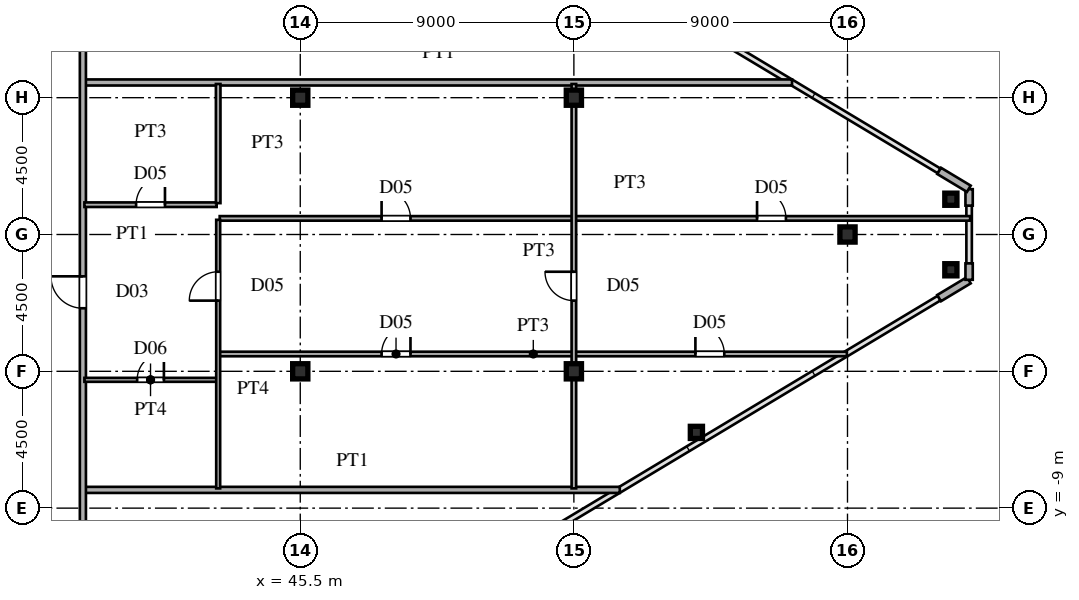
"""IFC4 building model, lengths in metres.
Left out: names, types, materials, properties, quantities, classifications, styles, units other than length and angle.
Written with IfcOpenShell. Run it as: python <this file> out.ifc"""

import sys

from ifc_helpers import new_model, si_unit, direction, frame, frame_2d, origin, origin_2d, place, context, subcontext, project, spatial, rectangle, hollow_rectangle, i_section, extrude, source, transform, mapped, element, fill, save


model = new_model("IFC4")
c1 = context("Model", 3, precision=1e-05, world=origin(), true_north=direction((0.0, 1.0)))
c2 = subcontext(c1, "Body", "Model", "MODEL_VIEW")
j1 = project(units=[si_unit("LENGTHUNIT", "METRE"), si_unit("PLANEANGLEUNIT", "RADIAN")], contexts=[c1])
p1 = place(None, origin())
s1 = spatial("IfcSite", under=j1, at=p1, CompositionType="ELEMENT")
p2 = place(p1, origin())
s2 = spatial("IfcBuilding", under=s1, at=p2, CompositionType="ELEMENT")
p3 = place(p2, frame((0.0, 0.0, 221.1)))
s3 = spatial("IfcBuildingStorey", under=s2, at=p3, CompositionType="ELEMENT", Elevation=221.1)
m1 = source(origin(), c2, "Body", "SweptSolid", [
    extrude(i_section(OverallWidth=0.5, OverallDepth=0.5, WebThickness=0.02, FlangeThickness=0.032, at=origin_2d()), origin(), (0.0, 0.0, 1.0), 3.6),
])
for number, where, z_axis, x_axis in (
    (1, (45.5, -4.5, 0.0), (0.0, 0.0, 1.0), (1.0, 0.0, 0.0)),
    (2, (45.5, 4.5, 0.0), (0.0, 0.0, 1.0), (1.0, 0.0, 0.0)),
    (3, (54.5, -4.5, 0.0), (0.0, 0.0, 1.0), (1.0, 0.0, 0.0)),
    (4, (54.5, 4.5, 0.0), (0.0, 0.0, 1.0), (1.0, 0.0, 0.0)),
    (5, (63.5, 0.0, 0.0), (0.0, 0.0, 1.0), (1.0, 0.0, 0.0)),
):
    element("IfcColumn", number, at=place(p3, frame(where, z_axis=z_axis, x_axis=x_axis)), inside=s3, PredefinedType="COLUMN", context=c2, shape_type="MappedRepresentation", body=[
        mapped(m1, transform((0.0, 0.0, 0.0), scale=1.0)),
    ])
m2 = source(origin(), c2, "Body", "SweptSolid", [
    extrude(hollow_rectangle(XDim=0.4, YDim=0.4, WallThickness=0.016, at=origin_2d()), origin(), (0.0, 0.0, 1.0), 3.6),
])
for number, where, z_axis, x_axis in (
    (6, (66.9, -1.16, 0.0), (0.0, 0.0, 1.0), (1.0, 0.0, 0.0)),
    (7, (66.9, 1.16, 0.0), (0.0, 0.0, 1.0), (1.0, 0.0, 0.0)),
    (8, (58.53, -6.509, 0.0), (0.0, 0.0, 1.0), (1.0, 0.0, 0.0)),
):
    element("IfcColumn", number, at=place(p3, frame(where, z_axis=z_axis, x_axis=x_axis)), inside=s3, PredefinedType="COLUMN", context=c2, shape_type="MappedRepresentation", body=[
        mapped(m2, transform((0.0, 0.0, 0.0), scale=1.0)),
    ])
p4 = place(p3, frame((66.514, -2.092, 0.0), z_axis=(0.0, 0.0, 1.0), x_axis=(0.85743623509, 0.514590228002, 0.0)))
e9 = element("IfcWall", 9, at=p4, inside=s3, PredefinedType="SOLIDWALL", context=c2, shape_type="SweptSolid", body=[
    extrude(rectangle(XDim=1.14, YDim=0.24, at=frame_2d((0.57, 0.0))), origin(), (0.0, 0.0, 1.0), 3.34),
])
for number, where, z_axis, x_axis in (
    (10, (67.5, -1.49, 0.0), (0.0, 0.0, 1.0), (0.0, 1.0, 0.0)),
    (11, (67.5, 0.95, 0.0), (0.0, 0.0, 1.0), (0.0, 1.0, 0.0)),
):
    element("IfcWall", number, at=place(p3, frame(where, z_axis=z_axis, x_axis=x_axis)), inside=s3, PredefinedType="SOLIDWALL", context=c2, shape_type="SweptSolid", body=[
        extrude(rectangle(XDim=0.54, YDim=0.24, at=frame_2d((0.27, 0.0))), origin(), (0.0, 0.0, 1.0), 3.34),
    ])
p5 = place(p3, frame((67.491, 1.505, 0.0), z_axis=(0.0, 0.0, 1.0), x_axis=(-0.85743623509, 0.514590228002, 0.0)))
e12 = element("IfcWall", 12, at=p5, inside=s3, PredefinedType="SOLIDWALL", context=c2, shape_type="SweptSolid", body=[
    extrude(rectangle(XDim=1.14, YDim=0.24, at=frame_2d((0.57, 0.0))), origin(), (0.0, 0.0, 1.0), 3.34),
])
p6 = place(p3, frame((38.43, -8.4, 0.0), z_axis=(0.0, 0.0, 1.0), x_axis=(1.0, 0.0, 0.0)))
e13 = element("IfcWall", 13, at=p6, inside=s3, PredefinedType="PARTITIONING", context=c2, shape_type="SweptSolid", body=[
    extrude(rectangle(XDim=17.58, YDim=0.2, at=frame_2d((8.79, 0.0))), origin(), (0.0, 0.0, 1.0), 3.34),
])
p7 = place(p3, frame((38.4, -4.78, 0.0), z_axis=(0.0, 0.0, 1.0), x_axis=(1.0, 0.0, 0.0)))
e14 = element("IfcWall", 14, at=p7, inside=s3, PredefinedType="PARTITIONING", context=c2, shape_type="SweptSolid", body=[
    extrude(rectangle(XDim=4.35, YDim=0.13, at=frame_2d((2.175, 0.0))), origin(), (0.0, 0.0, 1.0), 3.34),
])
p8 = place(p7, frame((1.735, 0.0, 0.0)))
e15 = element("IfcOpeningElement", 15, at=p8, cuts=e14, PredefinedType="OPENING", context=c2, shape_type="SweptSolid", body=[
    extrude(rectangle(XDim=0.88, YDim=2.1, at=frame_2d((0.44, 1.05))), frame((0.0, 0.075, 0.0), z_axis=(0.0, -1.0, 0.0), x_axis=(1.0, 0.0, 0.0)), (0.0, 0.0, 1.0), 0.15),
])
p9 = place(p3, frame((42.85, -3.93, 0.0), z_axis=(0.0, 0.0, 1.0), x_axis=(1.0, 0.0, 0.0)))
e16 = element("IfcWall", 16, at=p9, inside=s3, PredefinedType="PARTITIONING", context=c2, shape_type="SweptSolid", body=[
    extrude(rectangle(XDim=20.63, YDim=0.15, at=frame_2d((10.315, 0.0))), origin(), (0.0, 0.0, 1.0), 3.34),
])
p10 = place(p9, frame((5.325, 0.0, 0.0)))
e17 = element("IfcOpeningElement", 17, at=p10, cuts=e16, PredefinedType="OPENING", context=c2, shape_type="SweptSolid", body=[
    extrude(rectangle(XDim=0.95, YDim=2.15, at=frame_2d((0.475, 1.075))), frame((0.0, 0.085, 0.0), z_axis=(0.0, -1.0, 0.0), x_axis=(1.0, 0.0, 0.0)), (0.0, 0.0, 1.0), 0.17),
])
p11 = place(p9, frame((15.647, 0.0, 0.0)))
e18 = element("IfcOpeningElement", 18, at=p11, cuts=e16, PredefinedType="OPENING", context=c2, shape_type="SweptSolid", body=[
    extrude(rectangle(XDim=0.95, YDim=2.15, at=frame_2d((0.475, 1.075))), frame((0.0, 0.085, 0.0), z_axis=(0.0, -1.0, 0.0), x_axis=(1.0, 0.0, 0.0)), (0.0, 0.0, 1.0), 0.17),
])
p12 = place(p3, frame((42.85, 0.53, 0.0), z_axis=(0.0, 0.0, 1.0), x_axis=(1.0, 0.0, 0.0)))
e19 = element("IfcWall", 19, at=p12, inside=s3, PredefinedType="PARTITIONING", context=c2, shape_type="SweptSolid", body=[
    extrude(rectangle(XDim=24.685, YDim=0.15, at=frame_2d((12.342, 0.0))), origin(), (0.0, 0.0, 1.0), 3.34),
])
p13 = place(p12, frame((5.325, 0.0, 0.0)))
e20 = element("IfcOpeningElement", 20, at=p13, cuts=e19, PredefinedType="OPENING", context=c2, shape_type="SweptSolid", body=[
    extrude(rectangle(XDim=0.95, YDim=2.15, at=frame_2d((0.475, 1.075))), frame((0.0, 0.085, 0.0), z_axis=(0.0, -1.0, 0.0), x_axis=(1.0, 0.0, 0.0)), (0.0, 0.0, 1.0), 0.17),
])
p14 = place(p12, frame((17.675, 0.0, 0.0)))
e21 = element("IfcOpeningElement", 21, at=p14, cuts=e19, PredefinedType="OPENING", context=c2, shape_type="SweptSolid", body=[
    extrude(rectangle(XDim=0.95, YDim=2.15, at=frame_2d((0.475, 1.075))), frame((0.0, 0.085, 0.0), z_axis=(0.0, -1.0, 0.0), x_axis=(1.0, 0.0, 0.0)), (0.0, 0.0, 1.0), 0.17),
])
p15 = place(p3, frame((38.4, 0.98, 0.0), z_axis=(0.0, 0.0, 1.0), x_axis=(1.0, 0.0, 0.0)))
e22 = element("IfcWall", 22, at=p15, inside=s3, PredefinedType="PARTITIONING", context=c2, shape_type="SweptSolid", body=[
    extrude(rectangle(XDim=4.35, YDim=0.15, at=frame_2d((2.175, 0.0))), origin(), (0.0, 0.0, 1.0), 3.34),
])
p16 = place(p15, frame((1.7, 0.0, 0.0)))
e23 = element("IfcOpeningElement", 23, at=p16, cuts=e22, PredefinedType="OPENING", context=c2, shape_type="SweptSolid", body=[
    extrude(rectangle(XDim=0.95, YDim=2.15, at=frame_2d((0.475, 1.075))), frame((0.0, 0.085, 0.0), z_axis=(0.0, -1.0, 0.0), x_axis=(1.0, 0.0, 0.0)), (0.0, 0.0, 1.0), 0.17),
])
p17 = place(p3, frame((38.43, 5.0, 0.0), z_axis=(0.0, 0.0, 1.0), x_axis=(1.0, 0.0, 0.0)))
e24 = element("IfcWall", 24, at=p17, inside=s3, PredefinedType="PARTITIONING", context=c2, shape_type="SweptSolid", body=[
    extrude(rectangle(XDim=23.246, YDim=0.2, at=frame_2d((11.623, 0.0))), origin(), (0.0, 0.0, 1.0), 3.34),
])
p18 = place(p3, frame((38.35, -15.715, 0.0), z_axis=(0.0, 0.0, 1.0), x_axis=(0.0, 1.0, 0.0)))
e25 = element("IfcWall", 25, at=p18, inside=s3, PredefinedType="PARTITIONING", context=c2, shape_type="SweptSolid", body=[
    extrude(rectangle(XDim=31.43, YDim=0.2, at=frame_2d((15.715, 0.0))), origin(), (0.0, 0.0, 1.0), 3.34),
])
p19 = place(p18, frame((3.09, 0.0, 0.0)))
e26 = element("IfcOpeningElement", 26, at=p19, cuts=e25, PredefinedType="OPENING", context=c2, shape_type="SweptSolid", body=[
    extrude(rectangle(XDim=1.05, YDim=2.25, at=frame_2d((0.525, 1.125))), frame((0.0, 0.11, 0.0), z_axis=(0.0, -1.0, 0.0), x_axis=(1.0, 0.0, 0.0)), (0.0, 0.0, 1.0), 0.22),
])
p20 = place(p18, frame((13.289, 0.0, 0.0)))
e27 = element("IfcOpeningElement", 27, at=p20, cuts=e25, PredefinedType="OPENING", context=c2, shape_type="SweptSolid", body=[
    extrude(rectangle(XDim=1.05, YDim=2.25, at=frame_2d((0.525, 1.125))), frame((0.0, 0.11, 0.0), z_axis=(0.0, -1.0, 0.0), x_axis=(1.0, 0.0, 0.0)), (0.0, 0.0, 1.0), 0.22),
])
p21 = place(p18, frame((25.59, 0.0, 0.0)))
e28 = element("IfcOpeningElement", 28, at=p21, cuts=e25, PredefinedType="OPENING", context=c2, shape_type="SweptSolid", body=[
    extrude(rectangle(XDim=1.05, YDim=2.25, at=frame_2d((0.525, 1.125))), frame((0.0, 0.11, 0.0), z_axis=(0.0, -1.0, 0.0), x_axis=(1.0, 0.0, 0.0)), (0.0, 0.0, 1.0), 0.22),
])
p22 = place(p3, frame((42.8, -8.35, 0.0), z_axis=(0.0, 0.0, 1.0), x_axis=(0.0, 1.0, 0.0)))
e29 = element("IfcWall", 29, at=p22, inside=s3, PredefinedType="PARTITIONING", context=c2, shape_type="SweptSolid", body=[
    extrude(rectangle(XDim=8.833, YDim=0.13, at=frame_2d((4.417, 0.0))), origin(), (0.0, 0.0, 1.0), 3.34),
])
p23 = place(p22, frame((6.175, 0.0, 0.0)))
e30 = element("IfcOpeningElement", 30, at=p23, cuts=e29, PredefinedType="OPENING", context=c2, shape_type="SweptSolid", body=[
    extrude(rectangle(XDim=0.95, YDim=2.15, at=frame_2d((0.475, 1.075))), frame((0.0, 0.075, 0.0), z_axis=(0.0, -1.0, 0.0), x_axis=(1.0, 0.0, 0.0)), (0.0, 0.0, 1.0), 0.15),
])
p24 = place(p3, frame((42.8, 1.032, 0.0), z_axis=(0.0, 0.0, 1.0), x_axis=(0.0, 1.0, 0.0)))
e31 = element("IfcWall", 31, at=p24, inside=s3, PredefinedType="PARTITIONING", context=c2, shape_type="SweptSolid", body=[
    extrude(rectangle(XDim=3.918, YDim=0.15, at=frame_2d((1.959, 0.0))), origin(), (0.0, 0.0, 1.0), 3.34),
])
p25 = place(p3, frame((54.5, -8.35, 0.0), z_axis=(0.0, 0.0, 1.0), x_axis=(0.0, 1.0, 0.0)))
e32 = element("IfcWall", 32, at=p25, inside=s3, PredefinedType="PARTITIONING", context=c2, shape_type="SweptSolid", body=[
    extrude(rectangle(XDim=3.83, YDim=0.15, at=frame_2d((1.915, 0.0))), origin(), (0.0, 0.0, 1.0), 3.34),
])
p26 = place(p3, frame((54.5, -4.52, 0.0), z_axis=(0.0, 0.0, 1.0), x_axis=(0.0, 1.0, 0.0)))
e33 = element("IfcWall", 33, at=p26, inside=s3, PredefinedType="PARTITIONING", context=c2, shape_type="SweptSolid", body=[
    extrude(rectangle(XDim=9.47, YDim=0.15, at=frame_2d((4.735, 0.0))), origin(), (0.0, 0.0, 1.0), 2.44),
])
p27 = place(p26, frame((2.345, 0.0, 0.0)))
e34 = element("IfcOpeningElement", 34, at=p27, cuts=e33, PredefinedType="OPENING", context=c2, shape_type="SweptSolid", body=[
    extrude(rectangle(XDim=0.95, YDim=2.15, at=frame_2d((0.475, 1.075))), frame((0.0, 0.085, 0.0), z_axis=(0.0, -1.0, 0.0), x_axis=(1.0, 0.0, 0.0)), (0.0, 0.0, 1.0), 0.17),
])
m3 = source(origin(), c2, "Body", "SweptSolid", [
    extrude(rectangle(XDim=0.88, YDim=2.1, at=frame_2d((0.44, 1.05))), frame((0.0, 0.025, 0.0), z_axis=(0.0, -1.0, 0.0), x_axis=(1.0, 0.0, 0.0)), (0.0, 0.0, 1.0), 0.05),
])
p28 = place(p8, origin())
e35 = element("IfcDoor", 35, at=p28, inside=s3, OperationType="SINGLE_SWING_RIGHT", PredefinedType="DOOR", context=c2, shape_type="MappedRepresentation", body=[
    mapped(m3, transform((0.0, 0.0, 0.0), scale=1.0)),
])
fill(e15, e35)
m4 = source(origin(), c2, "Body", "SweptSolid", [
    extrude(rectangle(XDim=0.95, YDim=2.15, at=frame_2d((0.475, 1.075))), frame((0.0, 0.025, 0.0), z_axis=(0.0, -1.0, 0.0), x_axis=(1.0, 0.0, 0.0)), (0.0, 0.0, 1.0), 0.05),
])
p29 = place(p10, origin())
e36 = element("IfcDoor", 36, at=p29, inside=s3, OperationType="SINGLE_SWING_RIGHT", PredefinedType="DOOR", context=c2, shape_type="MappedRepresentation", body=[
    mapped(m4, transform((0.0, 0.0, 0.0), scale=1.0)),
])
fill(e17, e36)
p30 = place(p11, origin())
e37 = element("IfcDoor", 37, at=p30, inside=s3, OperationType="SINGLE_SWING_LEFT", PredefinedType="DOOR", context=c2, shape_type="MappedRepresentation", body=[
    mapped(m4, transform((0.0, 0.0, 0.0), scale=1.0)),
])
fill(e18, e37)
p31 = place(p13, origin())
e38 = element("IfcDoor", 38, at=p31, inside=s3, OperationType="SINGLE_SWING_LEFT", PredefinedType="DOOR", context=c2, shape_type="MappedRepresentation", body=[
    mapped(m4, transform((0.0, 0.0, 0.0), scale=1.0)),
])
fill(e20, e38)
p32 = place(p14, origin())
e39 = element("IfcDoor", 39, at=p32, inside=s3, OperationType="SINGLE_SWING_LEFT", PredefinedType="DOOR", context=c2, shape_type="MappedRepresentation", body=[
    mapped(m4, transform((0.0, 0.0, 0.0), scale=1.0)),
])
fill(e21, e39)
p33 = place(p16, origin())
e40 = element("IfcDoor", 40, at=p33, inside=s3, OperationType="SINGLE_SWING_RIGHT", PredefinedType="DOOR", context=c2, shape_type="MappedRepresentation", body=[
    mapped(m4, transform((0.0, 0.0, 0.0), scale=1.0)),
])
fill(e23, e40)
m5 = source(origin(), c2, "Body", "SweptSolid", [
    extrude(rectangle(XDim=1.05, YDim=2.25, at=frame_2d((0.525, 1.125))), frame((0.0, 0.025, 0.0), z_axis=(0.0, -1.0, 0.0), x_axis=(1.0, 0.0, 0.0)), (0.0, 0.0, 1.0), 0.05),
])
p34 = place(p20, origin())
e41 = element("IfcDoor", 41, at=p34, inside=s3, OperationType="SINGLE_SWING_RIGHT", PredefinedType="DOOR", context=c2, shape_type="MappedRepresentation", body=[
    mapped(m5, transform((0.0, 0.0, 0.0), scale=1.0)),
])
fill(e27, e41)
p35 = place(p23, origin())
e42 = element("IfcDoor", 42, at=p35, inside=s3, OperationType="SINGLE_SWING_LEFT", PredefinedType="DOOR", context=c2, shape_type="MappedRepresentation", body=[
    mapped(m4, transform((0.0, 0.0, 0.0), scale=1.0)),
])
fill(e30, e42)
p36 = place(p27, origin())
e43 = element("IfcDoor", 43, at=p36, inside=s3, OperationType="SINGLE_SWING_RIGHT", PredefinedType="DOOR", context=c2, shape_type="MappedRepresentation", body=[
    mapped(m4, transform((0.0, 0.0, 0.0), scale=1.0)),
])
fill(e34, e43)
save(model, sys.argv[1])
